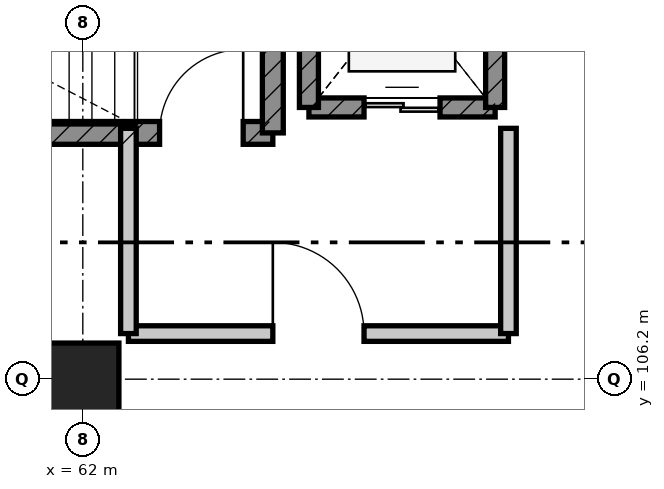
"""IFC4 building model, lengths in metres.
Left out: names, types, materials, properties, quantities, classifications, styles, units other than length and angle.
Written with IfcOpenShell. Run it as: python <this file> out.ifc"""

import sys

from ifc_helpers import new_model, si_unit, direction, frame, frame_2d, origin, origin_2d, place, context, subcontext, project, spatial, rectangle, extrude, element, fill, save


model = new_model("IFC4")
c1 = context("Model", 3, precision=1e-05, world=origin(), true_north=direction((0.0, 1.0)))
c2 = subcontext(c1, "Body", "Model", "MODEL_VIEW")
j1 = project(units=[si_unit("LENGTHUNIT", "METRE"), si_unit("PLANEANGLEUNIT", "RADIAN")], contexts=[c1])
p1 = place(None, origin())
s1 = spatial("IfcSite", under=j1, at=p1, CompositionType="ELEMENT")
p2 = place(p1, origin())
s2 = spatial("IfcBuilding", under=s1, at=p2, CompositionType="ELEMENT")
p3 = place(p2, origin())
s3 = spatial("IfcBuildingStorey", under=s2, at=p3, CompositionType="ELEMENT", Elevation=0.0)
p4 = place(p3, frame((62.0, 106.2, 0.0), z_axis=(0.0, 0.0, 1.0), x_axis=(1.0, 0.0, 0.0)))
e1 = element("IfcColumn", 1, at=p4, inside=s3, PredefinedType="COLUMN", context=c2, shape_type="SweptSolid", body=[
    extrude(rectangle(XDim=0.95, YDim=0.95, at=origin_2d()), origin(), (0.0, 0.0, 1.0), 5.4),
])
p5 = place(p3, frame((56.1, 109.44, 0.0), z_axis=(0.0, 0.0, 1.0), x_axis=(1.0, 0.0, 0.0)))
e2 = element("IfcWall", 2, at=p5, inside=s3, PredefinedType="SHEAR", context=c2, shape_type="SweptSolid", body=[
    extrude(rectangle(XDim=8.4, YDim=0.3, at=frame_2d((4.2, 0.0))), origin(), (0.0, 0.0, 1.0), 5.1),
])
p6 = place(p5, frame((6.91, 0.0, 0.0)))
e3 = element("IfcOpeningElement", 3, at=p6, cuts=e2, PredefinedType="OPENING", context=c2, shape_type="SweptSolid", body=[
    extrude(rectangle(XDim=1.1, YDim=2.1, at=frame_2d((0.55, 1.05))), frame((0.0, 0.16, 0.0), z_axis=(0.0, -1.0, 0.0), x_axis=(1.0, 0.0, 0.0)), (0.0, 0.0, 1.0), 0.32),
])
p7 = place(p3, frame((64.5, 109.44, 0.0), z_axis=(0.0, 0.0, 1.0), x_axis=(0.0, 1.0, 0.0)))
e4 = element("IfcWall", 4, at=p7, inside=s3, PredefinedType="SHEAR", context=c2, shape_type="SweptSolid", body=[
    extrude(rectangle(XDim=3.56, YDim=0.275, at=frame_2d((1.78, 0.0))), origin(), (0.0, 0.0, 1.0), 5.1),
])
p8 = place(p3, frame((64.975, 109.775, 0.0), z_axis=(0.0, 0.0, 1.0), x_axis=(1.0, 0.0, 0.0)))
e5 = element("IfcWall", 5, at=p8, inside=s3, PredefinedType="SHEAR", context=c2, shape_type="SweptSolid", body=[
    extrude(rectangle(XDim=2.45, YDim=0.25, at=frame_2d((1.225, 0.0))), origin(), (0.0, 0.0, 1.0), 5.1),
])
p9 = place(p8, frame((0.725, 0.0, 0.0)))
e6 = element("IfcOpeningElement", 6, at=p9, cuts=e5, PredefinedType="OPENING", context=c2, shape_type="SweptSolid", body=[
    extrude(rectangle(XDim=1.0, YDim=2.15, at=frame_2d((0.5, 1.075))), frame((0.0, 0.135, 0.0), z_axis=(0.0, -1.0, 0.0), x_axis=(1.0, 0.0, 0.0)), (0.0, 0.0, 1.0), 0.27),
])
for number, where, z_axis, x_axis in (
    (7, (67.425, 109.775, 0.0), (0.0, 0.0, 1.0), (0.0, 1.0, 0.0)),
    (8, (64.975, 112.825, 0.0), (0.0, 0.0, 1.0), (0.0, -1.0, 0.0)),
):
    element("IfcWall", number, at=place(p3, frame(where, z_axis=z_axis, x_axis=x_axis)), inside=s3, PredefinedType="SHEAR", context=c2, shape_type="SweptSolid", body=[
        extrude(rectangle(XDim=3.05, YDim=0.25, at=frame_2d((1.525, 0.0))), origin(), (0.0, 0.0, 1.0), 5.1),
    ])
p10 = place(p3, frame((62.6, 106.8, 0.0), z_axis=(0.0, 0.0, 1.0), x_axis=(1.0, 0.0, 0.0)))
e9 = element("IfcWall", 9, at=p10, inside=s3, PredefinedType="PARTITIONING", context=c2, shape_type="SweptSolid", body=[
    extrude(rectangle(XDim=5.0, YDim=0.205, at=frame_2d((2.5, 0.0))), origin(), (0.0, 0.0, 1.0), 5.1),
])
p11 = place(p10, frame((1.9, 0.0, 0.0)))
e10 = element("IfcOpeningElement", 10, at=p11, cuts=e9, PredefinedType="OPENING", context=c2, shape_type="SweptSolid", body=[
    extrude(rectangle(XDim=1.2, YDim=2.1, at=frame_2d((0.6, 1.05))), frame((0.0, 0.113, 0.0), z_axis=(0.0, -1.0, 0.0), x_axis=(1.0, 0.0, 0.0)), (0.0, 0.0, 1.0), 0.225),
])
for number, where, z_axis, x_axis in (
    (11, (67.6, 106.8, 0.0), (0.0, 0.0, 1.0), (0.0, 1.0, 0.0)),
    (12, (62.6, 109.5, 0.0), (0.0, 0.0, 1.0), (0.0, -1.0, 0.0)),
):
    element("IfcWall", number, at=place(p3, frame(where, z_axis=z_axis, x_axis=x_axis)), inside=s3, PredefinedType="PARTITIONING", context=c2, shape_type="SweptSolid", body=[
        extrude(rectangle(XDim=2.7, YDim=0.205, at=frame_2d((1.35, 0.0))), origin(), (0.0, 0.0, 1.0), 5.1),
    ])
p12 = place(p6, origin())
e13 = element("IfcDoor", 13, at=p12, inside=s3, OperationType="SINGLE_SWING_RIGHT", PredefinedType="DOOR", context=c2, shape_type="SweptSolid", body=[
    extrude(rectangle(XDim=1.1, YDim=2.1, at=frame_2d((0.55, 1.05))), frame((0.0, 0.025, 0.0), z_axis=(0.0, -1.0, 0.0), x_axis=(1.0, 0.0, 0.0)), (0.0, 0.0, 1.0), 0.05),
])
fill(e3, e13)
p13 = place(p9, origin())
e14 = element("IfcDoor", 14, at=p13, inside=s3, OperationType="DOUBLE_DOOR_SLIDING", PredefinedType="DOOR", context=c2, shape_type="SweptSolid", body=[
    extrude(rectangle(XDim=1.0, YDim=2.15, at=frame_2d((0.5, 1.075))), frame((0.0, 0.025, 0.0), z_axis=(0.0, -1.0, 0.0), x_axis=(1.0, 0.0, 0.0)), (0.0, 0.0, 1.0), 0.05),
])
fill(e6, e14)
p14 = place(p11, origin())
e15 = element("IfcDoor", 15, at=p14, inside=s3, OperationType="SINGLE_SWING_LEFT", PredefinedType="DOOR", context=c2, shape_type="SweptSolid", body=[
    extrude(rectangle(XDim=1.2, YDim=2.1, at=frame_2d((0.6, 1.05))), frame((0.0, 0.025, 0.0), z_axis=(0.0, -1.0, 0.0), x_axis=(1.0, 0.0, 0.0)), (0.0, 0.0, 1.0), 0.05),
])
fill(e10, e15)
save(model, sys.argv[1])
